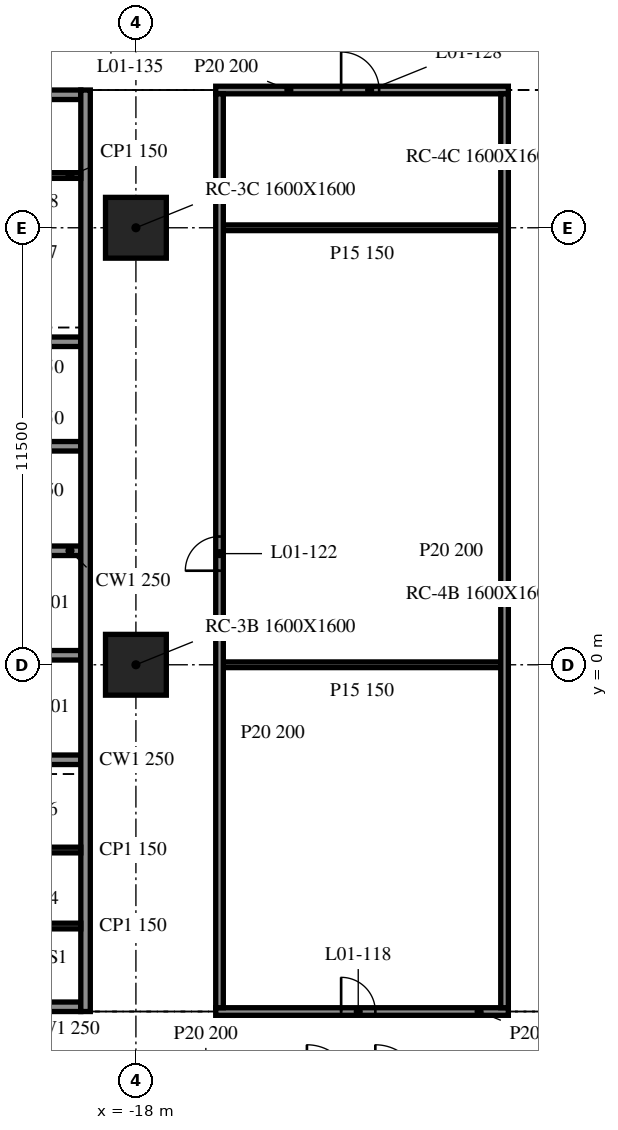
"""IFC4 building model, lengths in metres.
Left out: names, types, materials, properties, quantities, classifications, styles, units other than length and angle.
Written with IfcOpenShell. Run it as: python <this file> out.ifc"""

import sys

from ifc_helpers import new_model, si_unit, direction, frame, frame_2d, origin, origin_2d, place, context, subcontext, project, spatial, rectangle, extrude, element, fill, save


model = new_model("IFC4")
c1 = context("Model", 3, precision=1e-05, world=origin(), true_north=direction((0.0, 1.0)))
c2 = subcontext(c1, "Body", "Model", "MODEL_VIEW")
j1 = project(units=[si_unit("LENGTHUNIT", "METRE"), si_unit("PLANEANGLEUNIT", "RADIAN")], contexts=[c1])
p1 = place(None, origin())
s1 = spatial("IfcSite", under=j1, at=p1, CompositionType="ELEMENT")
p2 = place(p1, origin())
s2 = spatial("IfcBuilding", under=s1, at=p2, CompositionType="ELEMENT")
p3 = place(p2, frame((0.0, 0.0, 7.2)))
s3 = spatial("IfcBuildingStorey", under=s2, at=p3, CompositionType="ELEMENT", Elevation=7.2)
for number, where, z_axis, x_axis in (
    (1, (-18.0, 0.0, -0.34), (0.0, 0.0, 1.0), (1.0, 0.0, 0.0)),
    (2, (-18.0, 11.5, -0.34), (0.0, 0.0, 1.0), (1.0, 0.0, 0.0)),
):
    element("IfcColumn", number, at=place(p3, frame(where, z_axis=z_axis, x_axis=x_axis)), inside=s3, PredefinedType="COLUMN", context=c2, shape_type="SweptSolid", body=[
        extrude(rectangle(XDim=1.6, YDim=1.6, at=origin_2d()), origin(), (0.0, 0.0, 1.0), 4.3),
    ])
p4 = place(p3, frame((-19.325, -9.125, 0.0), z_axis=(0.0, 0.0, 1.0), x_axis=(0.0, 1.0, 0.0)))
e3 = element("IfcWall", 3, at=p4, inside=s3, PredefinedType="SOLIDWALL", context=c2, shape_type="SweptSolid", body=[
    extrude(rectangle(XDim=24.25, YDim=0.25, at=frame_2d((12.125, 0.0))), origin(), (0.0, 0.0, 1.0), 3.96),
])
p5 = place(p3, frame((-19.45, -9.0, 0.0), z_axis=(0.0, 0.0, 1.0), x_axis=(-1.0, 0.0, 0.0)))
e4 = element("IfcWall", 4, at=p5, inside=s3, PredefinedType="SOLIDWALL", context=c2, shape_type="SweptSolid", body=[
    extrude(rectangle(XDim=9.1, YDim=0.25, at=frame_2d((4.55, 0.0))), origin(), (0.0, 0.0, 1.0), 3.96),
])
p6 = place(p5, frame((3.65, 0.0, 0.0)))
e5 = element("IfcOpeningElement", 5, at=p6, cuts=e4, PredefinedType="OPENING", context=c2, shape_type="SweptSolid", body=[
    extrude(rectangle(XDim=1.8, YDim=2.1, at=frame_2d((0.9, 1.05))), frame((0.0, 0.135, 0.0), z_axis=(0.0, -1.0, 0.0), x_axis=(1.0, 0.0, 0.0)), (0.0, 0.0, 1.0), 0.27),
])
p7 = place(p3, frame((-28.55, 15.0, 0.0), z_axis=(0.0, 0.0, 1.0), x_axis=(1.0, 0.0, 0.0)))
e6 = element("IfcWall", 6, at=p7, inside=s3, PredefinedType="SOLIDWALL", context=c2, shape_type="SweptSolid", body=[
    extrude(rectangle(XDim=9.1, YDim=0.25, at=frame_2d((4.55, 0.0))), origin(), (0.0, 0.0, 1.0), 3.96),
])
p8 = place(p7, frame((3.65, 0.0, 0.0)))
e7 = element("IfcOpeningElement", 7, at=p8, cuts=e6, PredefinedType="OPENING", context=c2, shape_type="SweptSolid", body=[
    extrude(rectangle(XDim=1.8, YDim=2.1, at=frame_2d((0.9, 1.05))), frame((0.0, 0.135, 0.0), z_axis=(0.0, -1.0, 0.0), x_axis=(1.0, 0.0, 0.0)), (0.0, 0.0, 1.0), 0.27),
])
for number, where, z_axis, x_axis in (
    (8, (-22.3, -2.5, 0.0), (0.0, 0.0, 1.0), (1.0, 0.0, 0.0)),
    (9, (-22.3, 0.25, 0.0), (0.0, 0.0, 1.0), (1.0, 0.0, 0.0)),
    (10, (-22.3, 3.0, 0.0), (0.0, 0.0, 1.0), (1.0, 0.0, 0.0)),
    (11, (-22.3, 5.75, 0.0), (0.0, 0.0, 1.0), (1.0, 0.0, 0.0)),
    (12, (-22.3, 8.5, 0.0), (0.0, 0.0, 1.0), (1.0, 0.0, 0.0)),
):
    element("IfcWall", number, at=place(p3, frame(where, z_axis=z_axis, x_axis=x_axis)), inside=s3, PredefinedType="SOLIDWALL", context=c2, shape_type="SweptSolid", body=[
        extrude(rectangle(XDim=2.85, YDim=0.25, at=frame_2d((1.425, 0.0))), origin(), (0.0, 0.0, 1.0), 3.96),
    ])
for number, where, z_axis, x_axis in (
    (13, (-22.3, -6.875, 0.0), (0.0, 0.0, 1.0), (1.0, 0.0, 0.0)),
    (14, (-22.3, -4.875, 0.0), (0.0, 0.0, 1.0), (1.0, 0.0, 0.0)),
    (15, (-22.3, 12.875, 0.0), (0.0, 0.0, 1.0), (1.0, 0.0, 0.0)),
):
    element("IfcWall", number, at=place(p3, frame(where, z_axis=z_axis, x_axis=x_axis)), inside=s3, PredefinedType="PARTITIONING", context=c2, shape_type="SweptSolid", body=[
        extrude(rectangle(XDim=2.85, YDim=0.15, at=frame_2d((1.425, 0.0))), origin(), (0.0, 0.0, 1.0), 3.96),
    ])
p9 = place(p3, frame((-15.9, -9.125, 0.0), z_axis=(0.0, 0.0, 1.0), x_axis=(1.0, 0.0, 0.0)))
e16 = element("IfcWall", 16, at=p9, inside=s3, PredefinedType="PARTITIONING", context=c2, shape_type="SweptSolid", body=[
    extrude(rectangle(XDim=7.7, YDim=0.2, at=frame_2d((3.85, 0.0))), origin(), (0.0, 0.0, 1.0), 3.96),
])
p10 = place(p9, frame((3.3, 0.0, 0.0)))
e17 = element("IfcOpeningElement", 17, at=p10, cuts=e16, PredefinedType="OPENING", context=c2, shape_type="SweptSolid", body=[
    extrude(rectangle(XDim=0.9, YDim=2.1, at=frame_2d((0.45, 1.05))), frame((0.0, 0.11, 0.0), z_axis=(0.0, -1.0, 0.0), x_axis=(1.0, 0.0, 0.0)), (0.0, 0.0, 1.0), 0.22),
])
for number, where, z_axis, x_axis in (
    (18, (-15.7, 0.0, 0.0), (0.0, 0.0, 1.0), (1.0, 0.0, 0.0)),
    (19, (-15.7, 11.5, 0.0), (0.0, 0.0, 1.0), (1.0, 0.0, 0.0)),
):
    element("IfcWall", number, at=place(p3, frame(where, z_axis=z_axis, x_axis=x_axis)), inside=s3, PredefinedType="PARTITIONING", context=c2, shape_type="SweptSolid", body=[
        extrude(rectangle(XDim=7.3, YDim=0.15, at=frame_2d((3.65, 0.0))), origin(), (0.0, 0.0, 1.0), 3.96),
    ])
p11 = place(p3, frame((-15.9, 15.125, 0.0), z_axis=(0.0, 0.0, 1.0), x_axis=(1.0, 0.0, 0.0)))
e20 = element("IfcWall", 20, at=p11, inside=s3, PredefinedType="PARTITIONING", context=c2, shape_type="SweptSolid", body=[
    extrude(rectangle(XDim=7.7, YDim=0.2, at=frame_2d((3.85, 0.0))), origin(), (0.0, 0.0, 1.0), 3.96),
])
p12 = place(p11, frame((3.3, 0.0, 0.0)))
e21 = element("IfcOpeningElement", 21, at=p12, cuts=e20, PredefinedType="OPENING", context=c2, shape_type="SweptSolid", body=[
    extrude(rectangle(XDim=1.0, YDim=2.1, at=frame_2d((0.5, 1.05))), frame((0.0, 0.11, 0.0), z_axis=(0.0, -1.0, 0.0), x_axis=(1.0, 0.0, 0.0)), (0.0, 0.0, 1.0), 0.22),
])
p13 = place(p3, frame((-15.8, -9.025, 0.0), z_axis=(0.0, 0.0, 1.0), x_axis=(0.0, 1.0, 0.0)))
e22 = element("IfcWall", 22, at=p13, inside=s3, PredefinedType="PARTITIONING", context=c2, shape_type="SweptSolid", body=[
    extrude(rectangle(XDim=24.05, YDim=0.2, at=frame_2d((12.025, 0.0))), origin(), (0.0, 0.0, 1.0), 3.96),
])
p14 = place(p13, frame((11.5, 0.0, 0.0)))
e23 = element("IfcOpeningElement", 23, at=p14, cuts=e22, PredefinedType="OPENING", context=c2, shape_type="SweptSolid", body=[
    extrude(rectangle(XDim=0.9, YDim=2.1, at=frame_2d((0.45, 1.05))), frame((0.0, 0.11, 0.0), z_axis=(0.0, -1.0, 0.0), x_axis=(1.0, 0.0, 0.0)), (0.0, 0.0, 1.0), 0.22),
])
p15 = place(p3, frame((-8.3, -9.025, 0.0), z_axis=(0.0, 0.0, 1.0), x_axis=(0.0, 1.0, 0.0)))
e24 = element("IfcWall", 24, at=p15, inside=s3, PredefinedType="PARTITIONING", context=c2, shape_type="SweptSolid", body=[
    extrude(rectangle(XDim=24.05, YDim=0.2, at=frame_2d((12.025, 0.0))), origin(), (0.0, 0.0, 1.0), 3.96),
])
p16 = place(p10, origin())
e25 = element("IfcDoor", 25, at=p16, inside=s3, OperationType="SINGLE_SWING_LEFT", PredefinedType="DOOR", context=c2, shape_type="SweptSolid", body=[
    extrude(rectangle(XDim=0.9, YDim=2.1, at=frame_2d((0.45, 1.05))), frame((0.0, 0.025, 0.0), z_axis=(0.0, -1.0, 0.0), x_axis=(1.0, 0.0, 0.0)), (0.0, 0.0, 1.0), 0.05),
])
fill(e17, e25)
p17 = place(p14, origin())
e26 = element("IfcDoor", 26, at=p17, inside=s3, OperationType="SINGLE_SWING_RIGHT", PredefinedType="DOOR", context=c2, shape_type="SweptSolid", body=[
    extrude(rectangle(XDim=0.9, YDim=2.1, at=frame_2d((0.45, 1.05))), frame((0.0, 0.025, 0.0), z_axis=(0.0, -1.0, 0.0), x_axis=(1.0, 0.0, 0.0)), (0.0, 0.0, 1.0), 0.05),
])
fill(e23, e26)
p18 = place(p12, origin())
e27 = element("IfcDoor", 27, at=p18, inside=s3, OperationType="SINGLE_SWING_RIGHT", PredefinedType="DOOR", context=c2, shape_type="SweptSolid", body=[
    extrude(rectangle(XDim=1.0, YDim=2.1, at=frame_2d((0.5, 1.05))), frame((0.0, 0.025, 0.0), z_axis=(0.0, -1.0, 0.0), x_axis=(1.0, 0.0, 0.0)), (0.0, 0.0, 1.0), 0.05),
])
fill(e21, e27)
save(model, sys.argv[1])
